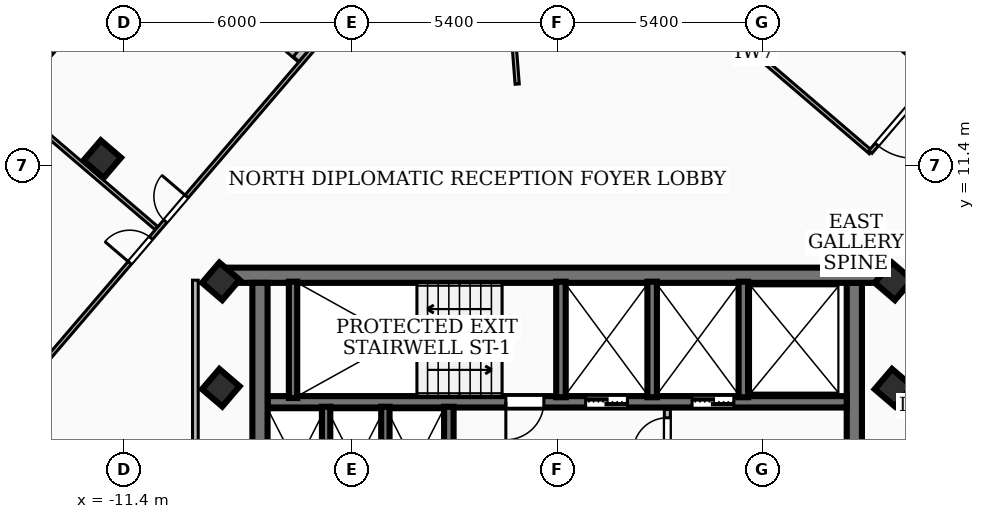
"""IFC4 building model, lengths in metres.
Left out: names, types, materials, properties, quantities, classifications, styles, units other than length and angle.
Written with IfcOpenShell. Run it as: python <this file> out.ifc"""

import sys

from ifc_helpers import new_model, si_unit, direction, frame, frame_2d, origin, origin_2d, place, context, subcontext, project, spatial, rectangle, extrude, element, fill, save


model = new_model("IFC4")
c1 = context("Model", 3, precision=1e-05, world=origin(), true_north=direction((0.0, 1.0)))
c2 = subcontext(c1, "Body", "Model", "MODEL_VIEW")
j1 = project(units=[si_unit("LENGTHUNIT", "METRE"), si_unit("PLANEANGLEUNIT", "RADIAN")], contexts=[c1])
p1 = place(None, origin())
s1 = spatial("IfcSite", under=j1, at=p1, CompositionType="ELEMENT")
p2 = place(p1, origin())
s2 = spatial("IfcBuilding", under=s1, at=p2, CompositionType="ELEMENT")
p3 = place(p2, frame((0.0, 0.0, 250.92)))
s3 = spatial("IfcBuildingStorey", under=s2, at=p3, CompositionType="ELEMENT", Elevation=250.92)
p4 = place(p3, frame((-8.78, 8.51, 0.0), z_axis=(0.0, 0.0, 1.0), x_axis=(1.0, 0.0, 0.0)))
e1 = element("IfcWall", 1, at=p4, inside=s3, PredefinedType="SHEAR", context=c2, shape_type="SweptSolid", body=[
    extrude(rectangle(XDim=17.56, YDim=0.4, at=frame_2d((8.78, 0.0))), origin(), (0.0, 0.0, 1.0), 3.16),
])
for number, where, z_axis, x_axis in (
    (2, (-7.82, 1.95, 0.0), (0.0, 0.0, 1.0), (0.0, 1.0, 0.0)),
    (3, (7.82, 8.31, 0.0), (0.0, 0.0, 1.0), (0.0, -1.0, 0.0)),
):
    element("IfcWall", number, at=place(p3, frame(where, z_axis=z_axis, x_axis=x_axis)), inside=s3, PredefinedType="SHEAR", context=c2, shape_type="SweptSolid", body=[
        extrude(rectangle(XDim=6.36, YDim=0.4, at=frame_2d((3.18, 0.0))), origin(), (0.0, 0.0, 1.0), 3.16),
    ])
p5 = place(p3, frame((7.62, 5.18, 0.0), z_axis=(0.0, 0.0, 1.0), x_axis=(-1.0, 0.0, 0.0)))
e4 = element("IfcWall", 4, at=p5, inside=s3, PredefinedType="SOLIDWALL", context=c2, shape_type="SweptSolid", body=[
    extrude(rectangle(XDim=15.24, YDim=0.3, at=frame_2d((7.62, 0.0))), origin(), (0.0, 0.0, 1.0), 3.16),
])
p6 = place(p5, frame((5.77, 0.0, 0.0)))
e5 = element("IfcOpeningElement", 5, at=p6, cuts=e4, PredefinedType="OPENING", context=c2, shape_type="SweptSolid", body=[
    extrude(rectangle(XDim=1.1, YDim=2.15, at=frame_2d((0.55, 1.075))), frame((0.0, 0.16, 0.0), z_axis=(0.0, -1.0, 0.0), x_axis=(1.0, 0.0, 0.0)), (0.0, 0.0, 1.0), 0.32),
])
p7 = place(p5, frame((2.97, 0.0, 0.0)))
e6 = element("IfcOpeningElement", 6, at=p7, cuts=e4, PredefinedType="OPENING", context=c2, shape_type="SweptSolid", body=[
    extrude(rectangle(XDim=1.1, YDim=2.15, at=frame_2d((0.55, 1.075))), frame((0.0, 0.16, 0.0), z_axis=(0.0, -1.0, 0.0), x_axis=(1.0, 0.0, 0.0)), (0.0, 0.0, 1.0), 0.32),
])
p8 = place(p5, frame((7.97, 0.0, 0.0)))
e7 = element("IfcOpeningElement", 7, at=p8, cuts=e4, PredefinedType="OPENING", context=c2, shape_type="SweptSolid", body=[
    extrude(rectangle(XDim=1.0, YDim=2.1, at=frame_2d((0.5, 1.05))), frame((0.0, 0.16, 0.0), z_axis=(0.0, -1.0, 0.0), x_axis=(1.0, 0.0, 0.0)), (0.0, 0.0, 1.0), 0.32),
])
p9 = place(p3, frame((-6.95, 5.28, 0.0), z_axis=(0.0, 0.0, 1.0), x_axis=(0.0, 1.0, 0.0)))
e8 = element("IfcWall", 8, at=p9, inside=s3, PredefinedType="SOLIDWALL", context=c2, shape_type="SweptSolid", body=[
    extrude(rectangle(XDim=3.06, YDim=0.22, at=frame_2d((1.53, 0.0))), origin(), (0.0, 0.0, 1.0), 3.16),
])
for number, where, z_axis, x_axis in (
    (9, (0.1, 5.3, 0.0), (0.0, 0.0, 1.0), (0.0, 1.0, 0.0)),
    (10, (2.5, 5.3, 0.0), (0.0, 0.0, 1.0), (0.0, 1.0, 0.0)),
    (11, (4.9, 5.3, 0.0), (0.0, 0.0, 1.0), (0.0, 1.0, 0.0)),
):
    element("IfcWall", number, at=place(p3, frame(where, z_axis=z_axis, x_axis=x_axis)), inside=s3, PredefinedType="SOLIDWALL", context=c2, shape_type="SweptSolid", body=[
        extrude(rectangle(XDim=3.04, YDim=0.25, at=frame_2d((1.52, 0.0))), origin(), (0.0, 0.0, 1.0), 3.16),
    ])
p10 = place(p3, frame((-2.85, 1.98, 0.0), z_axis=(0.0, 0.0, 1.0), x_axis=(0.0, 1.0, 0.0)))
e12 = element("IfcWall", 12, at=p10, inside=s3, PredefinedType="SOLIDWALL", context=c2, shape_type="SweptSolid", body=[
    extrude(rectangle(XDim=3.07, YDim=0.25, at=frame_2d((1.535, 0.0))), origin(), (0.0, 0.0, 1.0), 3.16),
])
for number, where, z_axis, x_axis in (
    (13, (-6.08, 1.98, 0.0), (0.0, 0.0, 1.0), (0.0, 1.0, 0.0)),
    (14, (-4.52, 1.98, 0.0), (0.0, 0.0, 1.0), (0.0, 1.0, 0.0)),
):
    element("IfcWall", number, at=place(p3, frame(where, z_axis=z_axis, x_axis=x_axis)), inside=s3, PredefinedType="SOLIDWALL", context=c2, shape_type="SweptSolid", body=[
        extrude(rectangle(XDim=3.07, YDim=0.22, at=frame_2d((1.535, 0.0))), origin(), (0.0, 0.0, 1.0), 3.16),
    ])
for number, where, z_axis, x_axis in (
    (15, (-8.85, 5.55, 0.0), (0.0, 0.0, 1.0), (0.65, 0.76, 0.0)),
    (16, (8.85, 5.55, 0.0), (0.0, 0.0, 1.0), (0.65, 0.76, 0.0)),
    (17, (-8.85, 8.35, 0.0), (0.0, 0.0, 1.0), (0.65, 0.76, 0.0)),
    (18, (8.85, 8.35, 0.0), (0.0, 0.0, 1.0), (0.65, 0.76, 0.0)),
    (19, (-11.971, 11.566, 0.0), (0.0, 0.0, 1.0), (0.65, 0.76, 0.0)),
):
    element("IfcColumn", number, at=place(p3, frame(where, z_axis=z_axis, x_axis=x_axis)), inside=s3, PredefinedType="COLUMN", context=c2, shape_type="SweptSolid", body=[
        extrude(rectangle(XDim=0.7, YDim=0.7, at=origin_2d()), origin(), (0.0, 0.0, 1.0), 3.42),
    ])
p11 = place(p3, frame((-17.943, 9.024, 0.0), z_axis=(0.0, 0.0, 1.0), x_axis=(0.650218389303, 0.759747356831, 0.0)))
e20 = element("IfcWall", 20, at=p11, inside=s3, PredefinedType="SOLIDWALL", context=c2, shape_type="SweptSolid", body=[
    extrude(rectangle(XDim=9.723, YDim=0.2, at=frame_2d((4.861, 0.0))), origin(), (0.0, 0.0, 1.0), 3.16),
])
p12 = place(p11, frame((6.834, 0.0, 0.85)))
e21 = element("IfcOpeningElement", 21, at=p12, cuts=e20, PredefinedType="OPENING", context=c2, shape_type="SweptSolid", body=[
    extrude(rectangle(XDim=1.5, YDim=1.5, at=frame_2d((0.75, 0.75))), frame((0.0, 0.11, 0.0), z_axis=(0.0, -1.0, 0.0), x_axis=(1.0, 0.0, 0.0)), (0.0, 0.0, 1.0), 0.22),
])
p13 = place(p3, frame((-9.522, 16.574, 0.0), z_axis=(0.0, 0.0, 1.0), x_axis=(0.759914066759, -0.650023546606, 0.0)))
e22 = element("IfcWall", 22, at=p13, inside=s3, PredefinedType="SOLIDWALL", context=c2, shape_type="SweptSolid", body=[
    extrude(rectangle(XDim=3.641, YDim=0.2, at=frame_2d((1.821, 0.0))), origin(), (0.0, 0.0, 1.0), 3.16),
])
p14 = place(p3, frame((-6.868, 14.198, 0.0), z_axis=(0.0, 0.0, 1.0), x_axis=(0.650240147413, 0.759728734939, 0.0)))
e23 = element("IfcWall", 23, at=p14, inside=s3, PredefinedType="SOLIDWALL", context=c2, shape_type="SweptSolid", body=[
    extrude(rectangle(XDim=6.64, YDim=0.2, at=frame_2d((3.32, 0.0))), origin(), (0.0, 0.0, 1.0), 3.16),
])
p15 = place(p3, frame((2.9, 2.04, 0.0), z_axis=(0.0, 0.0, 1.0), x_axis=(0.0, 1.0, 0.0)))
e24 = element("IfcWall", 24, at=p15, inside=s3, PredefinedType="PARTITIONING", context=c2, shape_type="SweptSolid", body=[
    extrude(rectangle(XDim=2.94, YDim=0.16, at=frame_2d((1.47, 0.0))), origin(), (0.0, 0.0, 1.0), 2.39),
])
p16 = place(p15, frame((1.82, 0.0, 0.0)))
e25 = element("IfcOpeningElement", 25, at=p16, cuts=e24, PredefinedType="OPENING", context=c2, shape_type="SweptSolid", body=[
    extrude(rectangle(XDim=0.9, YDim=2.06, at=frame_2d((0.45, 1.03))), frame((0.0, 0.09, 0.0), z_axis=(0.0, -1.0, 0.0), x_axis=(1.0, 0.0, 0.0)), (0.0, 0.0, 1.0), 0.18),
])
p17 = place(p3, frame((-9.52, 1.75, 0.0), z_axis=(0.0, 0.0, 1.0), x_axis=(0.0, 1.0, 0.0)))
e26 = element("IfcWall", 26, at=p17, inside=s3, PredefinedType="PARTITIONING", context=c2, shape_type="SweptSolid", body=[
    extrude(rectangle(XDim=6.63, YDim=0.15, at=frame_2d((3.315, 0.0))), origin(), (0.0, 0.0, 1.0), 2.53),
])
p18 = place(p3, frame((-1.052, 13.54, 0.0), z_axis=(0.0, 0.0, 1.0), x_axis=(-0.077356131702, 0.997003525013, 0.0)))
e27 = element("IfcWall", 27, at=p18, inside=s3, PredefinedType="PARTITIONING", context=c2, shape_type="SweptSolid", body=[
    extrude(rectangle(XDim=6.113, YDim=0.11, at=frame_2d((3.057, 0.0))), origin(), (0.0, 0.0, 1.0), 3.16),
])
p19 = place(p3, frame((8.251, 11.747, 0.0), z_axis=(0.0, 0.0, 1.0), x_axis=(-0.759658945325, 0.650321679469, 0.0)))
e28 = element("IfcWall", 28, at=p19, inside=s3, PredefinedType="PARTITIONING", context=c2, shape_type="SweptSolid", body=[
    extrude(rectangle(XDim=8.05, YDim=0.11, at=frame_2d((4.025, 0.0))), origin(), (0.0, 0.0, 1.0), 3.16),
])
p20 = place(p3, frame((9.941, 13.737, 0.0), z_axis=(0.0, 0.0, 1.0), x_axis=(-0.65016721503, -0.759791150581, 0.0)))
e29 = element("IfcWall", 29, at=p20, inside=s3, PredefinedType="PARTITIONING", context=c2, shape_type="SweptSolid", body=[
    extrude(rectangle(XDim=2.61, YDim=0.11, at=frame_2d((1.305, 0.0))), origin(), (0.0, 0.0, 1.0), 2.53),
])
p21 = place(p20, frame((0.855, 0.0, 0.0)))
e30 = element("IfcOpeningElement", 30, at=p21, cuts=e29, PredefinedType="OPENING", context=c2, shape_type="SweptSolid", body=[
    extrude(rectangle(XDim=1.5, YDim=2.12, at=frame_2d((0.75, 1.06))), frame((0.0, 0.065, 0.0), z_axis=(0.0, -1.0, 0.0), x_axis=(1.0, 0.0, 0.0)), (0.0, 0.0, 1.0), 0.13),
])
p22 = place(p3, frame((6.252, 16.894, 0.0), z_axis=(0.0, 0.0, 1.0), x_axis=(0.759715677597, -0.650255403063, 0.0)))
e31 = element("IfcWall", 31, at=p22, inside=s3, PredefinedType="PARTITIONING", context=c2, shape_type="SweptSolid", body=[
    extrude(rectangle(XDim=12.571, YDim=0.11, at=frame_2d((6.285, 0.0))), origin(), (0.0, 0.0, 1.0), 2.53),
])
p23 = place(p22, frame((6.655, 0.0, 0.0)))
e32 = element("IfcOpeningElement", 32, at=p23, cuts=e31, PredefinedType="OPENING", context=c2, shape_type="SweptSolid", body=[
    extrude(rectangle(XDim=0.86, YDim=2.04, at=frame_2d((0.43, 1.02))), frame((0.0, 0.065, 0.0), z_axis=(0.0, -1.0, 0.0), x_axis=(1.0, 0.0, 0.0)), (0.0, 0.0, 1.0), 0.13),
])
p24 = place(p22, frame((5.455, 0.0, 0.0)))
e33 = element("IfcOpeningElement", 33, at=p24, cuts=e31, PredefinedType="OPENING", context=c2, shape_type="SweptSolid", body=[
    extrude(rectangle(XDim=0.86, YDim=2.04, at=frame_2d((0.43, 1.02))), frame((0.0, 0.065, 0.0), z_axis=(0.0, -1.0, 0.0), x_axis=(1.0, 0.0, 0.0)), (0.0, 0.0, 1.0), 0.13),
])
p25 = place(p3, frame((-10.544, 9.749, 0.0), z_axis=(0.0, 0.0, 1.0), x_axis=(-0.759849347966, 0.650099198889, 0.0)))
e34 = element("IfcWall", 34, at=p25, inside=s3, PredefinedType="PARTITIONING", context=c2, shape_type="SweptSolid", body=[
    extrude(rectangle(XDim=5.085, YDim=0.11, at=frame_2d((2.542, 0.0))), origin(), (0.0, 0.0, 1.0), 3.16),
])
p26 = place(p3, frame((-17.437, 1.604, 0.0), z_axis=(0.0, 0.0, 1.0), x_axis=(0.650265099033, 0.759707378522, 0.0)))
e35 = element("IfcWall", 35, at=p26, inside=s3, PredefinedType="PARTITIONING", context=c2, shape_type="SweptSolid", body=[
    extrude(rectangle(XDim=20.139, YDim=0.11, at=frame_2d((10.07, 0.0))), origin(), (0.0, 0.0, 1.0), 2.53),
])
p27 = place(p26, frame((10.959, 0.0, 0.0)))
e36 = element("IfcOpeningElement", 36, at=p27, cuts=e35, PredefinedType="OPENING", context=c2, shape_type="SweptSolid", body=[
    extrude(rectangle(XDim=0.86, YDim=2.04, at=frame_2d((0.43, 1.02))), frame((0.0, 0.065, 0.0), z_axis=(0.0, -1.0, 0.0), x_axis=(1.0, 0.0, 0.0)), (0.0, 0.0, 1.0), 0.13),
])
p28 = place(p26, frame((9.519, 0.0, 0.0)))
e37 = element("IfcOpeningElement", 37, at=p28, cuts=e35, PredefinedType="OPENING", context=c2, shape_type="SweptSolid", body=[
    extrude(rectangle(XDim=0.86, YDim=2.04, at=frame_2d((0.43, 1.02))), frame((0.0, 0.065, 0.0), z_axis=(0.0, -1.0, 0.0), x_axis=(1.0, 0.0, 0.0)), (0.0, 0.0, 1.0), 0.13),
])
p29 = place(p12, origin())
e38 = element("IfcWindow", 38, at=p29, inside=s3, PartitioningType="SINGLE_PANEL", PredefinedType="WINDOW", context=c2, shape_type="SweptSolid", body=[
    extrude(rectangle(XDim=1.5, YDim=1.5, at=frame_2d((0.75, 0.75))), frame((0.0, 0.03, 0.0), z_axis=(0.0, -1.0, 0.0), x_axis=(1.0, 0.0, 0.0)), (0.0, 0.0, 1.0), 0.06),
])
fill(e21, e38)
p30 = place(p6, origin())
e39 = element("IfcDoor", 39, at=p30, inside=s3, OperationType="DOUBLE_DOOR_SLIDING", PredefinedType="DOOR", context=c2, shape_type="SweptSolid", body=[
    extrude(rectangle(XDim=1.1, YDim=2.15, at=frame_2d((0.55, 1.075))), frame((0.0, 0.025, 0.0), z_axis=(0.0, -1.0, 0.0), x_axis=(1.0, 0.0, 0.0)), (0.0, 0.0, 1.0), 0.05),
])
fill(e5, e39)
p31 = place(p7, origin())
e40 = element("IfcDoor", 40, at=p31, inside=s3, OperationType="DOUBLE_DOOR_SLIDING", PredefinedType="DOOR", context=c2, shape_type="SweptSolid", body=[
    extrude(rectangle(XDim=1.1, YDim=2.15, at=frame_2d((0.55, 1.075))), frame((0.0, 0.025, 0.0), z_axis=(0.0, -1.0, 0.0), x_axis=(1.0, 0.0, 0.0)), (0.0, 0.0, 1.0), 0.05),
])
fill(e6, e40)
p32 = place(p8, origin())
e41 = element("IfcDoor", 41, at=p32, inside=s3, OperationType="SINGLE_SWING_RIGHT", PredefinedType="DOOR", context=c2, shape_type="SweptSolid", body=[
    extrude(rectangle(XDim=1.0, YDim=2.1, at=frame_2d((0.5, 1.05))), frame((0.0, 0.025, 0.0), z_axis=(0.0, -1.0, 0.0), x_axis=(1.0, 0.0, 0.0)), (0.0, 0.0, 1.0), 0.05),
])
fill(e7, e41)
p33 = place(p16, origin())
e42 = element("IfcDoor", 42, at=p33, inside=s3, OperationType="SINGLE_SWING_LEFT", PredefinedType="DOOR", context=c2, shape_type="SweptSolid", body=[
    extrude(rectangle(XDim=0.9, YDim=2.06, at=frame_2d((0.45, 1.03))), frame((0.0, 0.025, 0.0), z_axis=(0.0, -1.0, 0.0), x_axis=(1.0, 0.0, 0.0)), (0.0, 0.0, 1.0), 0.05),
])
fill(e25, e42)
p34 = place(p21, origin())
e43 = element("IfcDoor", 43, at=p34, inside=s3, OperationType="SINGLE_SWING_LEFT", PredefinedType="DOOR", context=c2, shape_type="SweptSolid", body=[
    extrude(rectangle(XDim=1.5, YDim=2.12, at=frame_2d((0.75, 1.06))), frame((0.0, 0.025, 0.0), z_axis=(0.0, -1.0, 0.0), x_axis=(1.0, 0.0, 0.0)), (0.0, 0.0, 1.0), 0.05),
])
fill(e30, e43)
p35 = place(p27, origin())
e44 = element("IfcDoor", 44, at=p35, inside=s3, OperationType="SINGLE_SWING_RIGHT", PredefinedType="DOOR", context=c2, shape_type="SweptSolid", body=[
    extrude(rectangle(XDim=0.86, YDim=2.04, at=frame_2d((0.43, 1.02))), frame((0.0, 0.025, 0.0), z_axis=(0.0, -1.0, 0.0), x_axis=(1.0, 0.0, 0.0)), (0.0, 0.0, 1.0), 0.05),
])
fill(e36, e44)
p36 = place(p28, origin())
e45 = element("IfcDoor", 45, at=p36, inside=s3, OperationType="SINGLE_SWING_LEFT", PredefinedType="DOOR", context=c2, shape_type="SweptSolid", body=[
    extrude(rectangle(XDim=0.86, YDim=2.04, at=frame_2d((0.43, 1.02))), frame((0.0, 0.025, 0.0), z_axis=(0.0, -1.0, 0.0), x_axis=(1.0, 0.0, 0.0)), (0.0, 0.0, 1.0), 0.05),
])
fill(e37, e45)
save(model, sys.argv[1])
